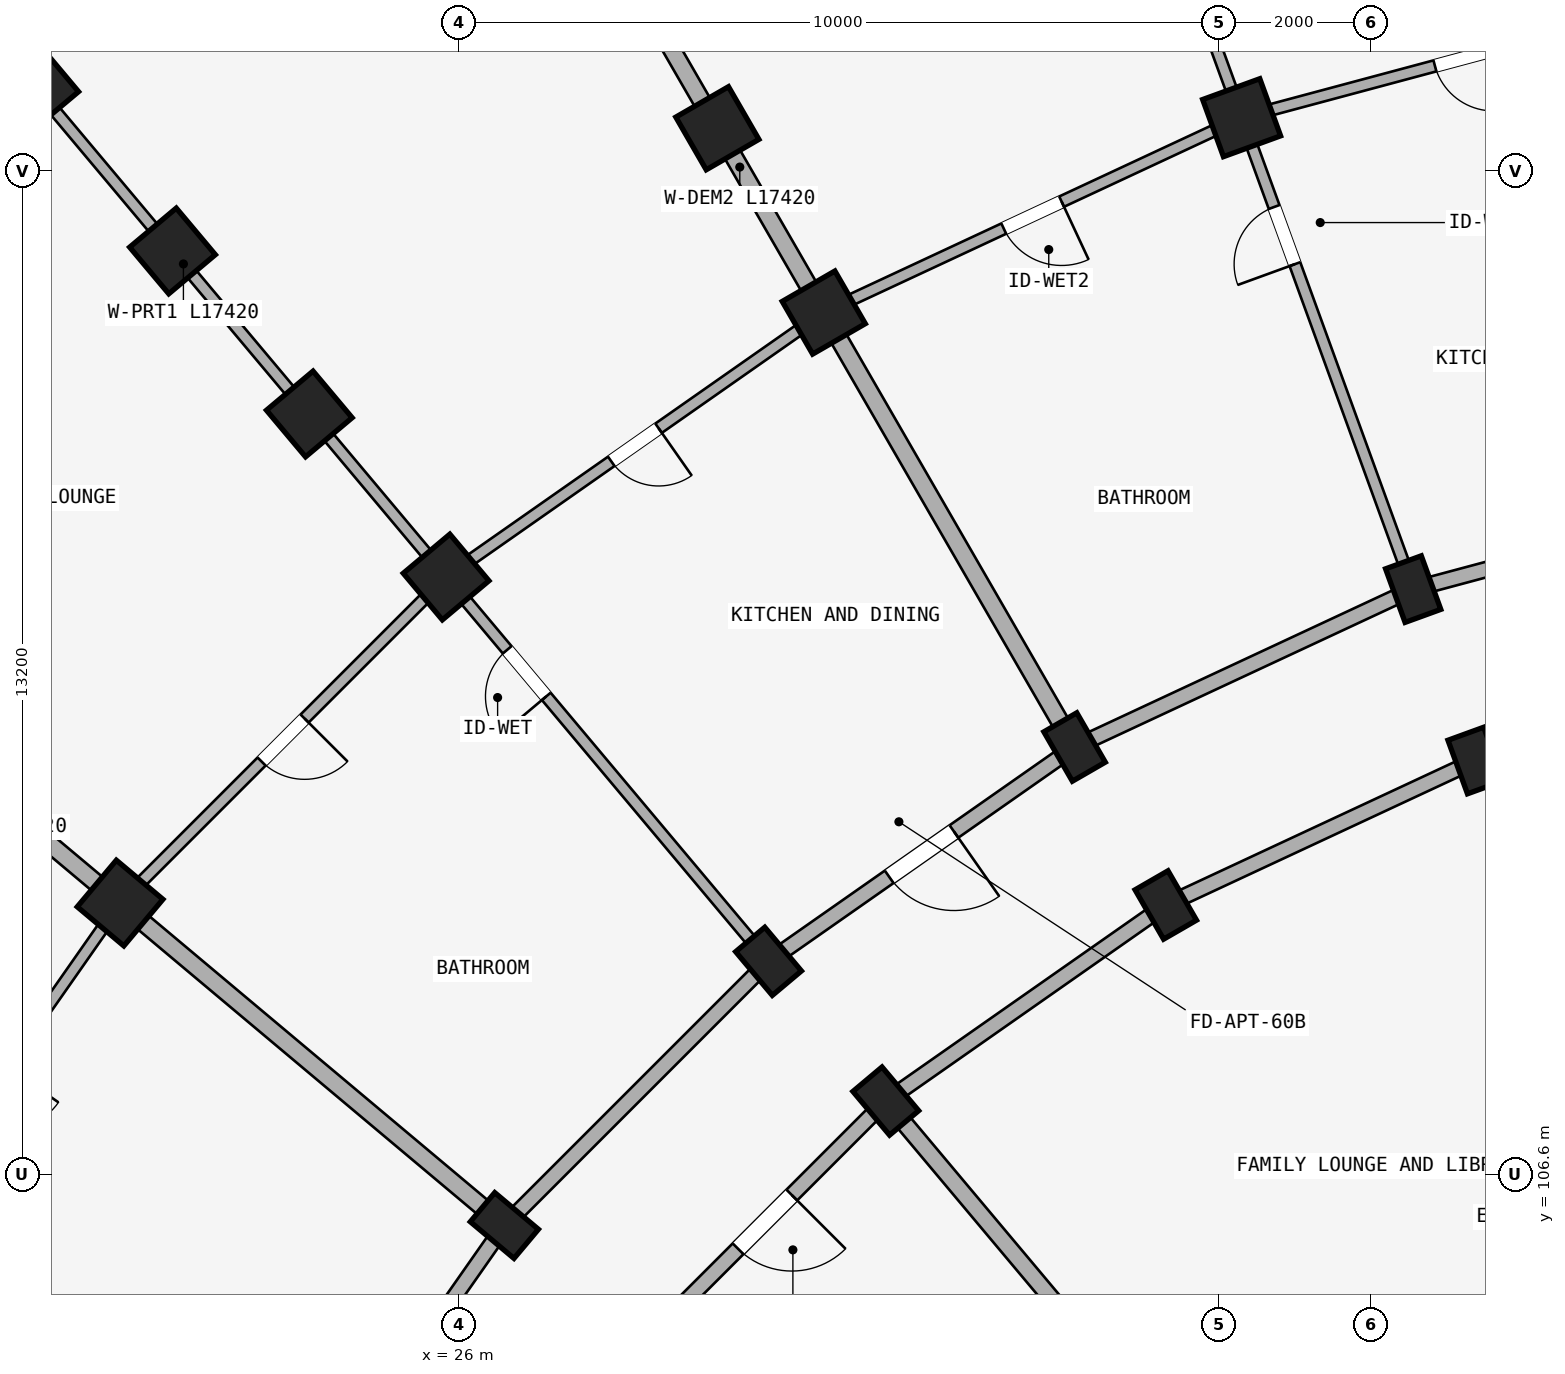
"""IFC4 building model, lengths in metres.
Left out: names, types, materials, properties, quantities, classifications, styles, units other than length and angle.
Written with IfcOpenShell. Run it as: python <this file> out.ifc"""

import sys

from ifc_helpers import new_model, si_unit, direction, frame, frame_2d, origin, origin_2d, place, context, subcontext, project, spatial, rectangle, extrude, element, fill, save


model = new_model("IFC4")
c1 = context("Model", 3, precision=1e-05, world=origin(), true_north=direction((0.0, 1.0)))
c2 = subcontext(c1, "Body", "Model", "MODEL_VIEW")
j1 = project(units=[si_unit("LENGTHUNIT", "METRE"), si_unit("PLANEANGLEUNIT", "RADIAN")], contexts=[c1])
p1 = place(None, origin())
s1 = spatial("IfcSite", under=j1, at=p1, CompositionType="ELEMENT")
p2 = place(p1, origin())
s2 = spatial("IfcBuilding", under=s1, at=p2, CompositionType="ELEMENT")
p3 = place(p2, frame((0.0, 0.0, 8.7)))
s3 = spatial("IfcBuildingStorey", under=s2, at=p3, CompositionType="ELEMENT", Elevation=8.7)
for number, where, z_axis, x_axis in (
    (1, (39.376, 112.044, 0.0), (0.0, 0.0, 1.0), (0.94, 0.342, 0.0)),
    (2, (38.555, 114.299, 0.0), (0.0, 0.0, 1.0), (0.94, 0.342, 0.0)),
):
    element("IfcColumn", number, at=place(p3, frame(where, z_axis=z_axis, x_axis=x_axis)), inside=s3, PredefinedType="COLUMN", context=c2, shape_type="SweptSolid", body=[
        extrude(rectangle(XDim=0.5, YDim=0.75, at=origin_2d()), origin(), (0.0, 0.0, 1.0), 2.93),
    ])
p4 = place(p3, frame((36.298, 120.501, 0.0), z_axis=(0.0, 0.0, 1.0), x_axis=(0.939692620786, 0.342020143326, 0.0)))
e3 = element("IfcColumn", 3, at=p4, inside=s3, PredefinedType="COLUMN", context=c2, shape_type="SweptSolid", body=[
    extrude(rectangle(XDim=0.8, YDim=0.8, at=origin_2d()), origin(), (0.0, 0.0, 1.0), 2.93),
])
for number, where, z_axis, x_axis in (
    (4, (35.3, 110.144, 0.0), (0.0, 0.0, 1.0), (0.866, 0.5, 0.0)),
    (5, (34.1, 112.222, 0.0), (0.0, 0.0, 1.0), (0.866, 0.5, 0.0)),
):
    element("IfcColumn", number, at=place(p3, frame(where, z_axis=z_axis, x_axis=x_axis)), inside=s3, PredefinedType="COLUMN", context=c2, shape_type="SweptSolid", body=[
        extrude(rectangle(XDim=0.5, YDim=0.75, at=origin_2d()), origin(), (0.0, 0.0, 1.0), 2.93),
    ])
for number, where, z_axis, x_axis in (
    (6, (30.8, 117.938, 0.0), (0.0, 0.0, 1.0), (0.866, 0.5, 0.0)),
    (7, (29.4, 120.363, 0.0), (0.0, 0.0, 1.0), (0.866, 0.5, 0.0)),
):
    element("IfcColumn", number, at=place(p3, frame(where, z_axis=z_axis, x_axis=x_axis)), inside=s3, PredefinedType="COLUMN", context=c2, shape_type="SweptSolid", body=[
        extrude(rectangle(XDim=0.8, YDim=0.8, at=origin_2d()), origin(), (0.0, 0.0, 1.0), 2.93),
    ])
for number, where, z_axis, x_axis in (
    (8, (31.616, 107.564, 0.0), (0.0, 0.0, 1.0), (0.766, 0.643, 0.0)),
    (9, (30.073, 109.402, 0.0), (0.0, 0.0, 1.0), (0.766, 0.643, 0.0)),
):
    element("IfcColumn", number, at=place(p3, frame(where, z_axis=z_axis, x_axis=x_axis)), inside=s3, PredefinedType="COLUMN", context=c2, shape_type="SweptSolid", body=[
        extrude(rectangle(XDim=0.5, YDim=0.75, at=origin_2d()), origin(), (0.0, 0.0, 1.0), 2.93),
    ])
for number, where, z_axis, x_axis in (
    (10, (25.831, 114.458, 0.0), (0.0, 0.0, 1.0), (0.766, 0.643, 0.0)),
    (11, (24.031, 116.603, 0.0), (0.0, 0.0, 1.0), (0.766, 0.643, 0.0)),
    (12, (22.231, 118.748, 0.0), (0.0, 0.0, 1.0), (0.766, 0.643, 0.0)),
    (13, (20.432, 120.893, 0.0), (0.0, 0.0, 1.0), (0.766, 0.643, 0.0)),
):
    element("IfcColumn", number, at=place(p3, frame(where, z_axis=z_axis, x_axis=x_axis)), inside=s3, PredefinedType="COLUMN", context=c2, shape_type="SweptSolid", body=[
        extrude(rectangle(XDim=0.8, YDim=0.8, at=origin_2d()), origin(), (0.0, 0.0, 1.0), 2.93),
    ])
p5 = place(p3, frame((26.598, 105.927, 0.0), z_axis=(0.0, 0.0, 1.0), x_axis=(0.642787609687, 0.766044443119, 0.0)))
e14 = element("IfcColumn", 14, at=p5, inside=s3, PredefinedType="COLUMN", context=c2, shape_type="SweptSolid", body=[
    extrude(rectangle(XDim=0.5, YDim=0.75, at=origin_2d()), origin(), (0.0, 0.0, 1.0), 2.93),
])
p6 = place(p3, frame((21.542, 110.169, 0.0), z_axis=(0.0, 0.0, 1.0), x_axis=(0.642787609687, 0.766044443119, 0.0)))
e15 = element("IfcColumn", 15, at=p6, inside=s3, PredefinedType="COLUMN", context=c2, shape_type="SweptSolid", body=[
    extrude(rectangle(XDim=0.8, YDim=0.8, at=origin_2d()), origin(), (0.0, 0.0, 1.0), 2.93),
])
p7 = place(p3, frame((43.72, 113.208, 0.0), z_axis=(0.0, 0.0, 1.0), x_axis=(-0.965934240054, -0.258787642463, 0.0)))
e16 = element("IfcWall", 16, at=p7, inside=s3, PredefinedType="STANDARD", context=c2, shape_type="SweptSolid", body=[
    extrude(rectangle(XDim=4.497, YDim=0.2, at=frame_2d((2.249, 0.0))), origin(), (0.0, 0.0, 1.0), 2.372),
])
p8 = place(p7, frame((1.709, 0.0, 0.0)))
e17 = element("IfcOpeningElement", 17, at=p8, cuts=e16, PredefinedType="OPENING", context=c2, shape_type="SweptSolid", body=[
    extrude(rectangle(XDim=1.08, YDim=2.15, at=frame_2d((0.54, 1.075))), frame((0.0, 0.11, 0.0), z_axis=(0.0, -1.0, 0.0), x_axis=(1.0, 0.0, 0.0)), (0.0, 0.0, 1.0), 0.22),
])
p9 = place(p3, frame((43.303, 115.572, 0.0), z_axis=(0.0, 0.0, 1.0), x_axis=(-0.965930095386, -0.258803112091, 0.0)))
e18 = element("IfcWall", 18, at=p9, inside=s3, PredefinedType="STANDARD", context=c2, shape_type="SweptSolid", body=[
    extrude(rectangle(XDim=4.916, YDim=0.2, at=frame_2d((2.458, 0.0))), origin(), (0.0, 0.0, 1.0), 2.372),
])
p10 = place(p3, frame((39.376, 112.044, 0.0), z_axis=(0.0, 0.0, 1.0), x_axis=(-0.906307919131, -0.422617978463, 0.0)))
e19 = element("IfcWall", 19, at=p10, inside=s3, PredefinedType="STANDARD", context=c2, shape_type="SweptSolid", body=[
    extrude(rectangle(XDim=4.497, YDim=0.2, at=frame_2d((2.249, 0.0))), origin(), (0.0, 0.0, 1.0), 2.372),
])
p11 = place(p3, frame((38.555, 114.299, 0.0), z_axis=(0.0, 0.0, 1.0), x_axis=(-0.906302381024, -0.422629854778, 0.0)))
e20 = element("IfcWall", 20, at=p11, inside=s3, PredefinedType="STANDARD", context=c2, shape_type="SweptSolid", body=[
    extrude(rectangle(XDim=4.915, YDim=0.2, at=frame_2d((2.458, 0.0))), origin(), (0.0, 0.0, 1.0), 2.372),
])
p12 = place(p3, frame((35.3, 110.144, 0.0), z_axis=(0.0, 0.0, 1.0), x_axis=(-0.819155404658, -0.573571637217, 0.0)))
e21 = element("IfcWall", 21, at=p12, inside=s3, PredefinedType="STANDARD", context=c2, shape_type="SweptSolid", body=[
    extrude(rectangle(XDim=4.497, YDim=0.2, at=frame_2d((2.249, 0.0))), origin(), (0.0, 0.0, 1.0), 2.372),
])
p13 = place(p3, frame((34.1, 112.222, 0.0), z_axis=(0.0, 0.0, 1.0), x_axis=(-0.819140911474, -0.573592335331, 0.0)))
e22 = element("IfcWall", 22, at=p13, inside=s3, PredefinedType="STANDARD", context=c2, shape_type="SweptSolid", body=[
    extrude(rectangle(XDim=4.916, YDim=0.2, at=frame_2d((2.458, 0.0))), origin(), (0.0, 0.0, 1.0), 2.372),
])
p14 = place(p13, frame((1.938, 0.0, 0.0)))
e23 = element("IfcOpeningElement", 23, at=p14, cuts=e22, PredefinedType="OPENING", context=c2, shape_type="SweptSolid", body=[
    extrude(rectangle(XDim=1.04, YDim=2.15, at=frame_2d((0.52, 1.075))), frame((0.0, 0.11, 0.0), z_axis=(0.0, -1.0, 0.0), x_axis=(1.0, 0.0, 0.0)), (0.0, 0.0, 1.0), 0.22),
])
p15 = place(p3, frame((31.616, 107.564, 0.0), z_axis=(0.0, 0.0, 1.0), x_axis=(-0.707106781187, -0.707106781187, 0.0)))
e24 = element("IfcWall", 24, at=p15, inside=s3, PredefinedType="STANDARD", context=c2, shape_type="SweptSolid", body=[
    extrude(rectangle(XDim=4.497, YDim=0.2, at=frame_2d((2.249, 0.0))), origin(), (0.0, 0.0, 1.0), 2.372),
])
p16 = place(p15, frame((1.749, 0.0, 0.0)))
e25 = element("IfcOpeningElement", 25, at=p16, cuts=e24, PredefinedType="OPENING", context=c2, shape_type="SweptSolid", body=[
    extrude(rectangle(XDim=1.0, YDim=2.15, at=frame_2d((0.5, 1.075))), frame((0.0, 0.11, 0.0), z_axis=(0.0, -1.0, 0.0), x_axis=(1.0, 0.0, 0.0)), (0.0, 0.0, 1.0), 0.22),
])
p17 = place(p3, frame((30.073, 109.402, 0.0), z_axis=(0.0, 0.0, 1.0), x_axis=(-0.707106781187, -0.707106781187, 0.0)))
e26 = element("IfcWall", 26, at=p17, inside=s3, PredefinedType="STANDARD", context=c2, shape_type="SweptSolid", body=[
    extrude(rectangle(XDim=4.916, YDim=0.2, at=frame_2d((2.458, 0.0))), origin(), (0.0, 0.0, 1.0), 2.372),
])
p18 = place(p3, frame((26.598, 105.927, 0.0), z_axis=(0.0, 0.0, 1.0), x_axis=(-0.573592335331, -0.819140911474, 0.0)))
e27 = element("IfcWall", 27, at=p18, inside=s3, PredefinedType="STANDARD", context=c2, shape_type="SweptSolid", body=[
    extrude(rectangle(XDim=4.916, YDim=0.2, at=frame_2d((2.458, 0.0))), origin(), (0.0, 0.0, 1.0), 2.372),
])
p19 = place(p18, frame((1.918, 0.0, 0.0)))
e28 = element("IfcOpeningElement", 28, at=p19, cuts=e27, PredefinedType="OPENING", context=c2, shape_type="SweptSolid", body=[
    extrude(rectangle(XDim=1.08, YDim=2.15, at=frame_2d((0.54, 1.075))), frame((0.0, 0.11, 0.0), z_axis=(0.0, -1.0, 0.0), x_axis=(1.0, 0.0, 0.0)), (0.0, 0.0, 1.0), 0.22),
])
p20 = place(p3, frame((38.521, 114.393, 0.0), z_axis=(0.0, 0.0, 1.0), x_axis=(-0.342022120477, 0.939691901159, 0.0)))
e29 = element("IfcWall", 29, at=p20, inside=s3, PredefinedType="PARTITIONING", context=c2, shape_type="SweptSolid", body=[
    extrude(rectangle(XDim=17.42, YDim=0.15, at=frame_2d((8.71, 0.0))), origin(), (0.0, 0.0, 1.0), 2.372),
])
p21 = place(p20, frame((4.45, 0.0, 0.0)))
e30 = element("IfcOpeningElement", 30, at=p21, cuts=e29, PredefinedType="OPENING", context=c2, shape_type="SweptSolid", body=[
    extrude(rectangle(XDim=0.8, YDim=2.1, at=frame_2d((0.4, 1.05))), frame((0.0, 0.085, 0.0), z_axis=(0.0, -1.0, 0.0), x_axis=(1.0, 0.0, 0.0)), (0.0, 0.0, 1.0), 0.17),
])
p22 = place(p3, frame((34.05, 112.309, 0.0), z_axis=(0.0, 0.0, 1.0), x_axis=(-0.499997843263, 0.866026648973, 0.0)))
e31 = element("IfcWall", 31, at=p22, inside=s3, PredefinedType="STANDARD", context=c2, shape_type="SweptSolid", body=[
    extrude(rectangle(XDim=17.42, YDim=0.23, at=frame_2d((8.71, 0.0))), origin(), (0.0, 0.0, 1.0), 2.372),
])
p23 = place(p3, frame((35.987, 102.355, 0.0), z_axis=(0.0, 0.0, 1.0), x_axis=(-0.642784846501, 0.766046761698, 0.0)))
e32 = element("IfcWall", 32, at=p23, inside=s3, PredefinedType="STANDARD", context=c2, shape_type="SweptSolid", body=[
    extrude(rectangle(XDim=6.75, YDim=0.22, at=frame_2d((3.375, 0.0))), origin(), (0.0, 0.0, 1.0), 2.372),
])
p24 = place(p3, frame((30.009, 109.479, 0.0), z_axis=(0.0, 0.0, 1.0), x_axis=(-0.642784757967, 0.766046835987, 0.0)))
e33 = element("IfcWall", 33, at=p24, inside=s3, PredefinedType="PARTITIONING", context=c2, shape_type="SweptSolid", body=[
    extrude(rectangle(XDim=17.42, YDim=0.15, at=frame_2d((8.71, 0.0))), origin(), (0.0, 0.0, 1.0), 2.372),
])
p25 = place(p24, frame((4.45, 0.0, 0.0)))
e34 = element("IfcOpeningElement", 34, at=p25, cuts=e33, PredefinedType="OPENING", context=c2, shape_type="SweptSolid", body=[
    extrude(rectangle(XDim=0.8, YDim=2.1, at=frame_2d((0.4, 1.05))), frame((0.0, 0.085, 0.0), z_axis=(0.0, -1.0, 0.0), x_axis=(1.0, 0.0, 0.0)), (0.0, 0.0, 1.0), 0.17),
])
p26 = place(p3, frame((26.521, 105.991, 0.0), z_axis=(0.0, 0.0, 1.0), x_axis=(-0.766046835987, 0.642784757967, 0.0)))
e35 = element("IfcWall", 35, at=p26, inside=s3, PredefinedType="STANDARD", context=c2, shape_type="SweptSolid", body=[
    extrude(rectangle(XDim=17.42, YDim=0.23, at=frame_2d((8.71, 0.0))), origin(), (0.0, 0.0, 1.0), 2.372),
])
p27 = place(p3, frame((23.691, 101.95, 0.0), z_axis=(0.0, 0.0, 1.0), x_axis=(-0.866026648973, 0.499997843263, 0.0)))
e36 = element("IfcWall", 36, at=p27, inside=s3, PredefinedType="PARTITIONING", context=c2, shape_type="SweptSolid", body=[
    extrude(rectangle(XDim=17.42, YDim=0.15, at=frame_2d((8.71, 0.0))), origin(), (0.0, 0.0, 1.0), 2.372),
])
p28 = place(p27, frame((4.45, 0.0, 0.0)))
e37 = element("IfcOpeningElement", 37, at=p28, cuts=e36, PredefinedType="OPENING", context=c2, shape_type="SweptSolid", body=[
    extrude(rectangle(XDim=0.8, YDim=2.1, at=frame_2d((0.4, 1.05))), frame((0.0, 0.085, 0.0), z_axis=(0.0, -1.0, 0.0), x_axis=(1.0, 0.0, 0.0)), (0.0, 0.0, 1.0), 0.17),
])
p29 = place(p3, frame((42.157, 122.071, 0.0), z_axis=(0.0, 0.0, 1.0), x_axis=(-0.965923618901, -0.258827283048, 0.0)))
e38 = element("IfcWall", 38, at=p29, inside=s3, PredefinedType="PLUMBINGWALL", context=c2, shape_type="SweptSolid", body=[
    extrude(rectangle(XDim=6.066, YDim=0.15, at=frame_2d((3.033, 0.0))), origin(), (0.0, 0.0, 1.0), 2.372),
])
p30 = place(p29, frame((2.633, 0.0, 0.0)))
e39 = element("IfcOpeningElement", 39, at=p30, cuts=e38, PredefinedType="OPENING", context=c2, shape_type="SweptSolid", body=[
    extrude(rectangle(XDim=0.8, YDim=2.1, at=frame_2d((0.4, 1.05))), frame((0.0, 0.085, 0.0), z_axis=(0.0, -1.0, 0.0), x_axis=(1.0, 0.0, 0.0)), (0.0, 0.0, 1.0), 0.17),
])
p31 = place(p3, frame((36.298, 120.501, 0.0), z_axis=(0.0, 0.0, 1.0), x_axis=(-0.906312656069, -0.42260781991, 0.0)))
e40 = element("IfcWall", 40, at=p31, inside=s3, PredefinedType="PLUMBINGWALL", context=c2, shape_type="SweptSolid", body=[
    extrude(rectangle(XDim=6.066, YDim=0.15, at=frame_2d((3.033, 0.0))), origin(), (0.0, 0.0, 1.0), 2.372),
])
p32 = place(p31, frame((2.613, 0.0, 0.0)))
e41 = element("IfcOpeningElement", 41, at=p32, cuts=e40, PredefinedType="OPENING", context=c2, shape_type="SweptSolid", body=[
    extrude(rectangle(XDim=0.84, YDim=2.1, at=frame_2d((0.42, 1.05))), frame((0.0, 0.085, 0.0), z_axis=(0.0, -1.0, 0.0), x_axis=(1.0, 0.0, 0.0)), (0.0, 0.0, 1.0), 0.17),
])
p33 = place(p3, frame((30.8, 117.938, 0.0), z_axis=(0.0, 0.0, 1.0), x_axis=(-0.81913926159, -0.573594691504, 0.0)))
e42 = element("IfcWall", 42, at=p33, inside=s3, PredefinedType="PLUMBINGWALL", context=c2, shape_type="SweptSolid", body=[
    extrude(rectangle(XDim=6.066, YDim=0.15, at=frame_2d((3.033, 0.0))), origin(), (0.0, 0.0, 1.0), 2.372),
])
p34 = place(p33, frame((2.653, 0.0, 0.0)))
e43 = element("IfcOpeningElement", 43, at=p34, cuts=e42, PredefinedType="OPENING", context=c2, shape_type="SweptSolid", body=[
    extrude(rectangle(XDim=0.76, YDim=2.05, at=frame_2d((0.38, 1.025))), frame((0.0, 0.085, 0.0), z_axis=(0.0, -1.0, 0.0), x_axis=(1.0, 0.0, 0.0)), (0.0, 0.0, 1.0), 0.17),
])
p35 = place(p3, frame((25.831, 114.458, 0.0), z_axis=(0.0, 0.0, 1.0), x_axis=(-0.707106781187, -0.707106781187, 0.0)))
e44 = element("IfcWall", 44, at=p35, inside=s3, PredefinedType="PLUMBINGWALL", context=c2, shape_type="SweptSolid", body=[
    extrude(rectangle(XDim=6.066, YDim=0.15, at=frame_2d((3.033, 0.0))), origin(), (0.0, 0.0, 1.0), 2.372),
])
p36 = place(p35, frame((2.633, 0.0, 0.0)))
e45 = element("IfcOpeningElement", 45, at=p36, cuts=e44, PredefinedType="OPENING", context=c2, shape_type="SweptSolid", body=[
    extrude(rectangle(XDim=0.8, YDim=2.1, at=frame_2d((0.4, 1.05))), frame((0.0, 0.085, 0.0), z_axis=(0.0, -1.0, 0.0), x_axis=(1.0, 0.0, 0.0)), (0.0, 0.0, 1.0), 0.17),
])
p37 = place(p3, frame((21.542, 110.169, 0.0), z_axis=(0.0, 0.0, 1.0), x_axis=(-0.573594691504, -0.81913926159, 0.0)))
e46 = element("IfcWall", 46, at=p37, inside=s3, PredefinedType="PLUMBINGWALL", context=c2, shape_type="SweptSolid", body=[
    extrude(rectangle(XDim=6.066, YDim=0.15, at=frame_2d((3.033, 0.0))), origin(), (0.0, 0.0, 1.0), 2.372),
])
p38 = place(p37, frame((2.613, 0.0, 0.0)))
e47 = element("IfcOpeningElement", 47, at=p38, cuts=e46, PredefinedType="OPENING", context=c2, shape_type="SweptSolid", body=[
    extrude(rectangle(XDim=0.84, YDim=2.1, at=frame_2d((0.42, 1.05))), frame((0.0, 0.085, 0.0), z_axis=(0.0, -1.0, 0.0), x_axis=(1.0, 0.0, 0.0)), (0.0, 0.0, 1.0), 0.17),
])
p39 = place(p3, frame((41.464, 105.461, 0.0), z_axis=(0.0, 0.0, 1.0), x_axis=(-0.906311629168, -0.422610022166, 0.0)))
e48 = element("IfcWall", 48, at=p39, inside=s3, PredefinedType="STANDARD", context=c2, shape_type="SweptSolid", body=[
    extrude(rectangle(XDim=2.718, YDim=0.275, at=frame_2d((1.359, 0.0))), origin(), (0.0, 0.0, 1.0), 2.472),
])
p40 = place(p39, frame((0.729, 0.0, 0.0)))
e49 = element("IfcOpeningElement", 49, at=p40, cuts=e48, PredefinedType="OPENING", context=c2, shape_type="SweptSolid", body=[
    extrude(rectangle(XDim=1.26, YDim=2.15, at=frame_2d((0.63, 1.075))), frame((0.0, 0.147, 0.0), z_axis=(0.0, -1.0, 0.0), x_axis=(1.0, 0.0, 0.0)), (0.0, 0.0, 1.0), 0.295),
])
p41 = place(p21, origin())
e50 = element("IfcDoor", 50, at=p41, inside=s3, OperationType="SINGLE_SWING_LEFT", PredefinedType="DOOR", context=c2, shape_type="SweptSolid", body=[
    extrude(rectangle(XDim=0.8, YDim=2.1, at=frame_2d((0.4, 1.05))), frame((0.0, 0.025, 0.0), z_axis=(0.0, -1.0, 0.0), x_axis=(1.0, 0.0, 0.0)), (0.0, 0.0, 1.0), 0.05),
])
fill(e30, e50)
p42 = place(p25, frame((0.8, 0.0, 0.0), z_axis=(0.0, 0.0, 1.0), x_axis=(-1.0, 0.0, 0.0)))
e51 = element("IfcDoor", 51, at=p42, inside=s3, OperationType="SINGLE_SWING_RIGHT", PredefinedType="DOOR", context=c2, shape_type="SweptSolid", body=[
    extrude(rectangle(XDim=0.8, YDim=2.1, at=frame_2d((0.4, 1.05))), frame((0.0, 0.025, 0.0), z_axis=(0.0, -1.0, 0.0), x_axis=(1.0, 0.0, 0.0)), (0.0, 0.0, 1.0), 0.05),
])
fill(e34, e51)
p43 = place(p30, origin())
e52 = element("IfcDoor", 52, at=p43, inside=s3, OperationType="SINGLE_SWING_LEFT", PredefinedType="DOOR", context=c2, shape_type="SweptSolid", body=[
    extrude(rectangle(XDim=0.8, YDim=2.1, at=frame_2d((0.4, 1.05))), frame((0.0, 0.025, 0.0), z_axis=(0.0, -1.0, 0.0), x_axis=(1.0, 0.0, 0.0)), (0.0, 0.0, 1.0), 0.05),
])
fill(e39, e52)
p44 = place(p32, frame((0.84, 0.0, 0.0), z_axis=(0.0, 0.0, 1.0), x_axis=(-1.0, 0.0, 0.0)))
e53 = element("IfcDoor", 53, at=p44, inside=s3, OperationType="SINGLE_SWING_RIGHT", PredefinedType="DOOR", context=c2, shape_type="SweptSolid", body=[
    extrude(rectangle(XDim=0.84, YDim=2.1, at=frame_2d((0.42, 1.05))), frame((0.0, 0.025, 0.0), z_axis=(0.0, -1.0, 0.0), x_axis=(1.0, 0.0, 0.0)), (0.0, 0.0, 1.0), 0.05),
])
fill(e41, e53)
p45 = place(p14, origin())
e54 = element("IfcDoor", 54, at=p45, inside=s3, OperationType="SINGLE_SWING_LEFT", PredefinedType="DOOR", context=c2, shape_type="SweptSolid", body=[
    extrude(rectangle(XDim=1.04, YDim=2.15, at=frame_2d((0.52, 1.075))), frame((0.0, 0.025, 0.0), z_axis=(0.0, -1.0, 0.0), x_axis=(1.0, 0.0, 0.0)), (0.0, 0.0, 1.0), 0.05),
])
fill(e23, e54)
p46 = place(p34, frame((0.76, 0.0, 0.0), z_axis=(0.0, 0.0, 1.0), x_axis=(-1.0, 0.0, 0.0)))
e55 = element("IfcDoor", 55, at=p46, inside=s3, OperationType="SINGLE_SWING_RIGHT", PredefinedType="DOOR", context=c2, shape_type="SweptSolid", body=[
    extrude(rectangle(XDim=0.76, YDim=2.05, at=frame_2d((0.38, 1.025))), frame((0.0, 0.025, 0.0), z_axis=(0.0, -1.0, 0.0), x_axis=(1.0, 0.0, 0.0)), (0.0, 0.0, 1.0), 0.05),
])
fill(e43, e55)
p47 = place(p36, origin())
e56 = element("IfcDoor", 56, at=p47, inside=s3, OperationType="SINGLE_SWING_LEFT", PredefinedType="DOOR", context=c2, shape_type="SweptSolid", body=[
    extrude(rectangle(XDim=0.8, YDim=2.1, at=frame_2d((0.4, 1.05))), frame((0.0, 0.025, 0.0), z_axis=(0.0, -1.0, 0.0), x_axis=(1.0, 0.0, 0.0)), (0.0, 0.0, 1.0), 0.05),
])
fill(e45, e56)
p48 = place(p16, frame((1.0, 0.0, 0.0), z_axis=(0.0, 0.0, 1.0), x_axis=(-1.0, 0.0, 0.0)))
e57 = element("IfcDoor", 57, at=p48, inside=s3, OperationType="SINGLE_SWING_RIGHT", PredefinedType="DOOR", context=c2, shape_type="SweptSolid", body=[
    extrude(rectangle(XDim=1.0, YDim=2.15, at=frame_2d((0.5, 1.075))), frame((0.0, 0.025, 0.0), z_axis=(0.0, -1.0, 0.0), x_axis=(1.0, 0.0, 0.0)), (0.0, 0.0, 1.0), 0.05),
])
fill(e25, e57)
save(model, sys.argv[1])
